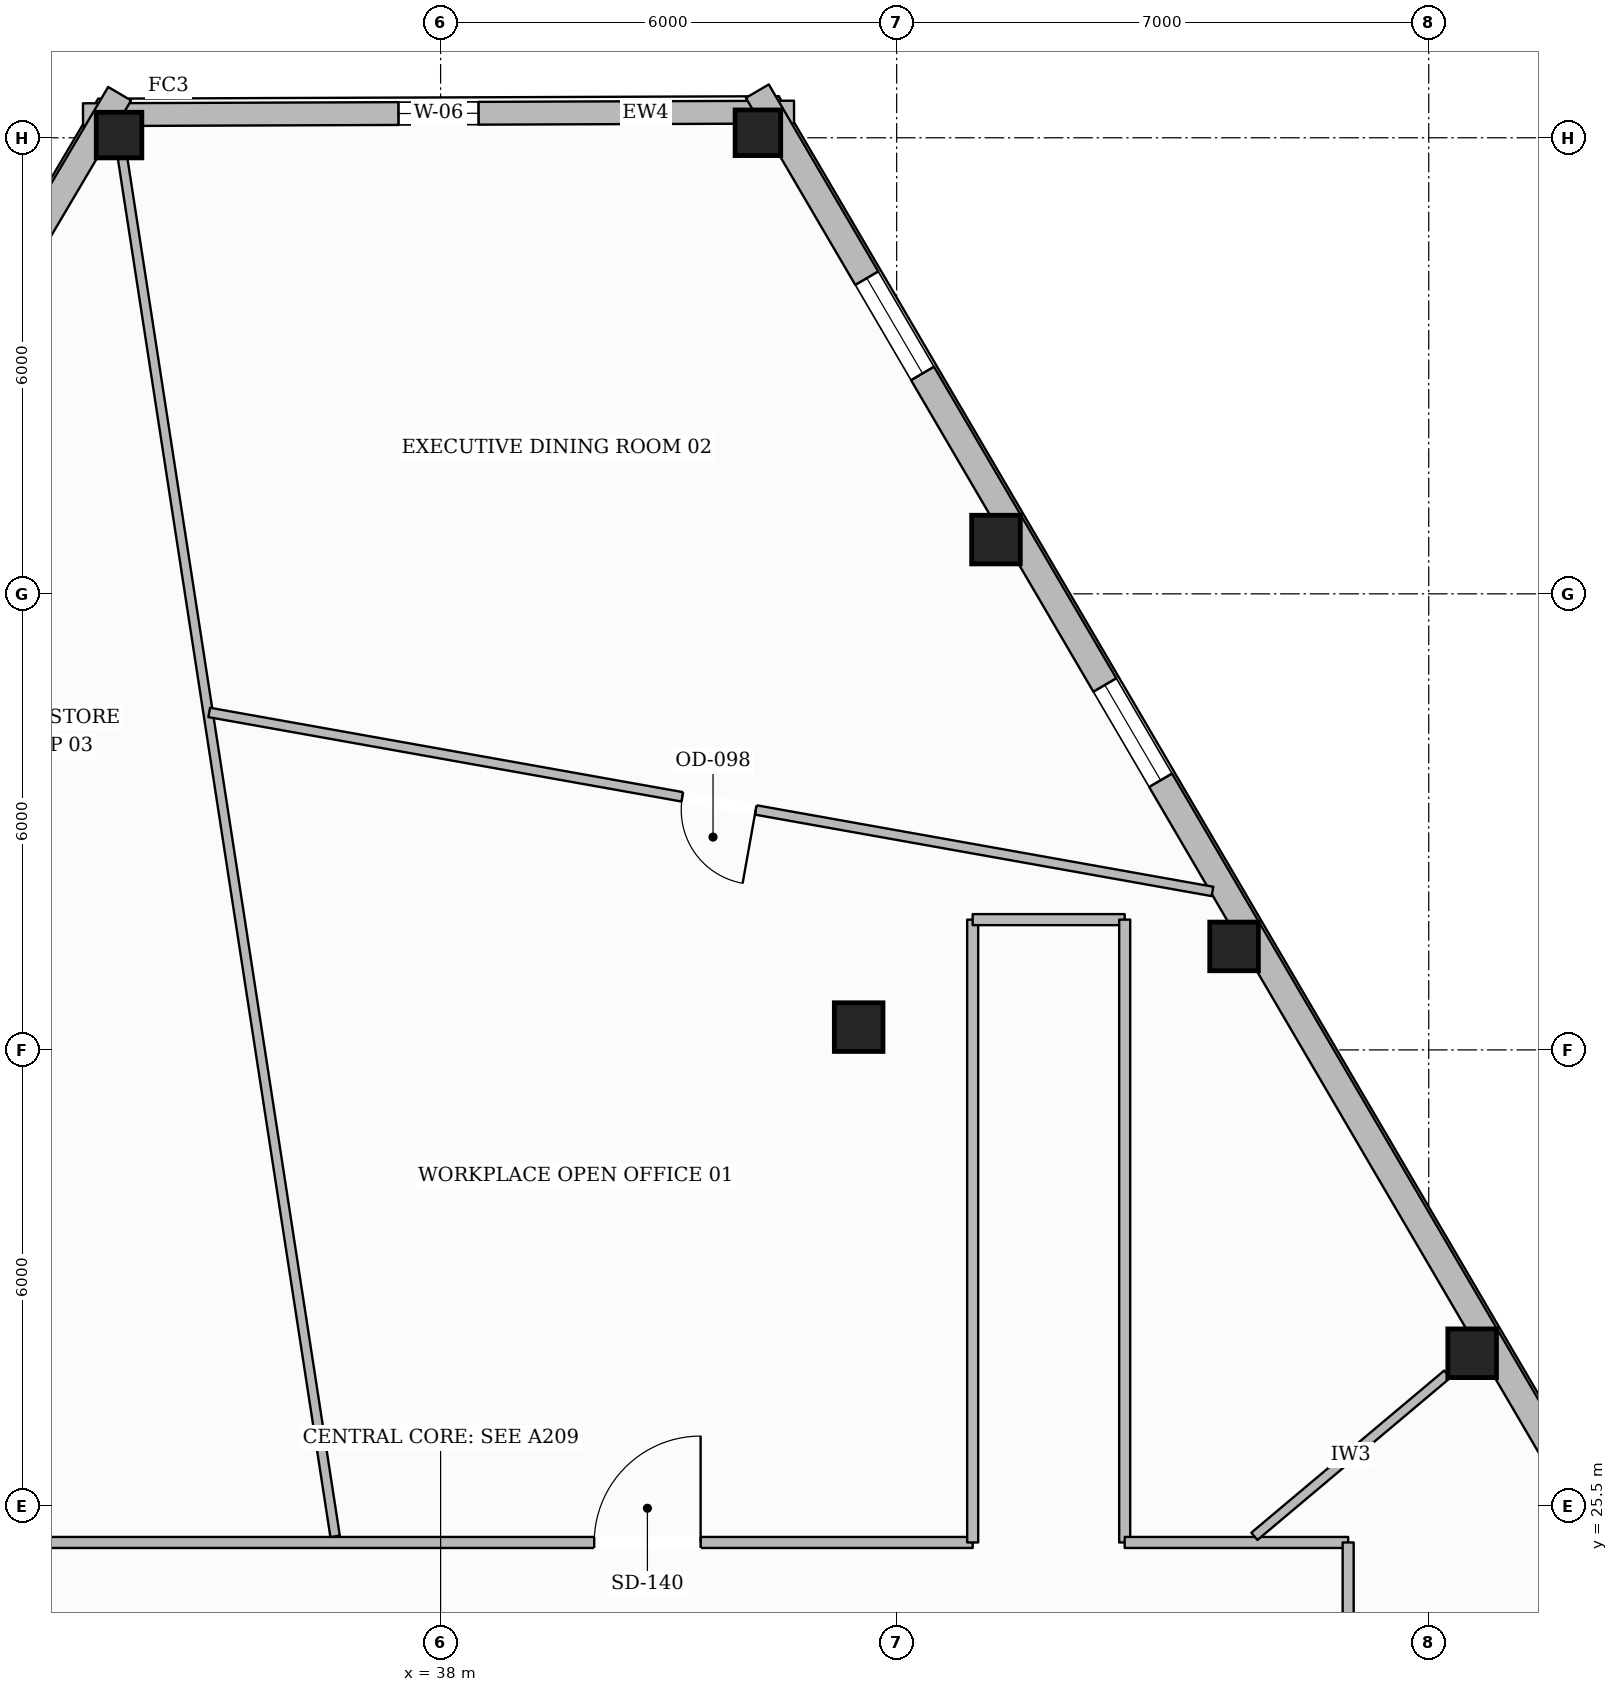
"""IFC4 building model, lengths in metres.
Left out: names, types, materials, properties, quantities, classifications, styles, units other than length and angle.
Written with IfcOpenShell. Run it as: python <this file> out.ifc"""

import sys

from ifc_helpers import new_model, si_unit, direction, frame, frame_2d, origin, origin_2d, place, context, subcontext, project, spatial, rectangle, hollow_rectangle, extrude, element, fill, save


model = new_model("IFC4")
c1 = context("Model", 3, precision=1e-05, world=origin(), true_north=direction((0.0, 1.0)))
c2 = subcontext(c1, "Body", "Model", "MODEL_VIEW")
j1 = project(units=[si_unit("LENGTHUNIT", "METRE"), si_unit("PLANEANGLEUNIT", "RADIAN")], contexts=[c1])
p1 = place(None, origin())
s1 = spatial("IfcSite", under=j1, at=p1, CompositionType="ELEMENT")
p2 = place(p1, origin())
s2 = spatial("IfcBuilding", under=s1, at=p2, CompositionType="ELEMENT")
p3 = place(p2, frame((0.0, 0.0, 207.35)))
s3 = spatial("IfcBuildingStorey", under=s2, at=p3, CompositionType="ELEMENT", Elevation=207.35)
p4 = place(p3, frame((33.769, 43.535, 0.0), z_axis=(0.0, 0.0, 1.0), x_axis=(1.0, 0.0, 0.0)))
e1 = element("IfcColumn", 1, at=p4, inside=s3, PredefinedType="COLUMN", context=c2, shape_type="SweptSolid", body=[
    extrude(hollow_rectangle(XDim=0.6, YDim=0.6, WallThickness=0.028, at=origin_2d()), origin(), (0.0, 0.0, 1.0), 3.6),
])
for number, where, z_axis, x_axis in (
    (2, (51.571, 27.509, 0.0), (0.0, 0.0, 1.0), (1.0, 0.0, 0.0)),
    (3, (48.439, 32.862, 0.0), (0.0, 0.0, 1.0), (1.0, 0.0, 0.0)),
    (4, (45.307, 38.214, 0.0), (0.0, 0.0, 1.0), (1.0, 0.0, 0.0)),
):
    element("IfcColumn", number, at=place(p3, frame(where, z_axis=z_axis, x_axis=x_axis)), inside=s3, PredefinedType="COLUMN", context=c2, shape_type="SweptSolid", body=[
        extrude(hollow_rectangle(XDim=0.64, YDim=0.64, WallThickness=0.028, at=origin_2d()), origin(), (0.0, 0.0, 1.0), 3.6),
    ])
p5 = place(p3, frame((42.174, 43.566, 0.0), z_axis=(0.0, 0.0, 1.0), x_axis=(1.0, 0.0, 0.0)))
e5 = element("IfcColumn", 5, at=p5, inside=s3, PredefinedType="COLUMN", context=c2, shape_type="SweptSolid", body=[
    extrude(hollow_rectangle(XDim=0.6, YDim=0.6, WallThickness=0.028, at=origin_2d()), origin(), (0.0, 0.0, 1.0), 3.6),
])
p6 = place(p3, frame((43.5, 31.8, 0.0), z_axis=(0.0, 0.0, 1.0), x_axis=(1.0, 0.0, 0.0)))
e6 = element("IfcColumn", 6, at=p6, inside=s3, PredefinedType="COLUMN", context=c2, shape_type="SweptSolid", body=[
    extrude(hollow_rectangle(XDim=0.64, YDim=0.64, WallThickness=0.028, at=origin_2d()), origin(), (0.0, 0.0, 1.0), 3.6),
])
p7 = place(p3, frame((33.295, 43.804, 0.0), z_axis=(0.0, 0.0, 1.0), x_axis=(0.999993419862, 0.003627703449, 0.0)))
e7 = element("IfcWall", 7, at=p7, inside=s3, PredefinedType="STANDARD", context=c2, shape_type="SweptSolid", body=[
    extrude(rectangle(XDim=9.354, YDim=0.3, at=frame_2d((4.677, 0.0))), origin(), (0.0, 0.0, 1.0), 3.132),
])
p8 = place(p7, frame((4.152, 0.0, 0.65)))
e8 = element("IfcOpeningElement", 8, at=p8, cuts=e7, PredefinedType="OPENING", context=c2, shape_type="SweptSolid", body=[
    extrude(rectangle(XDim=1.05, YDim=1.7, at=frame_2d((0.525, 0.85))), frame((0.0, 0.16, 0.0), z_axis=(0.0, -1.0, 0.0), x_axis=(1.0, 0.0, 0.0)), (0.0, 0.0, 1.0), 0.32),
])
p9 = place(p3, frame((14.256, 11.0, 0.0), z_axis=(0.0, 0.0, 1.0), x_axis=(0.508231558921, 0.861220461042, 0.0)))
e9 = element("IfcWall", 9, at=p9, inside=s3, PredefinedType="STANDARD", context=c2, shape_type="SweptSolid", body=[
    extrude(rectangle(XDim=38.41, YDim=0.35, at=frame_2d((19.205, 0.0))), origin(), (0.0, 0.0, 1.0), 3.132),
])
p10 = place(p9, frame((34.091, 0.0, 0.65)))
e10 = element("IfcOpeningElement", 10, at=p10, cuts=e9, PredefinedType="OPENING", context=c2, shape_type="SweptSolid", body=[
    extrude(rectangle(XDim=1.45, YDim=1.75, at=frame_2d((0.725, 0.875))), frame((0.0, 0.185, 0.0), z_axis=(0.0, -1.0, 0.0), x_axis=(1.0, 0.0, 0.0)), (0.0, 0.0, 1.0), 0.37),
])
p11 = place(p9, frame((27.848, 0.0, 0.65)))
e11 = element("IfcOpeningElement", 11, at=p11, cuts=e9, PredefinedType="OPENING", context=c2, shape_type="SweptSolid", body=[
    extrude(rectangle(XDim=1.45, YDim=1.75, at=frame_2d((0.725, 0.875))), frame((0.0, 0.185, 0.0), z_axis=(0.0, -1.0, 0.0), x_axis=(1.0, 0.0, 0.0)), (0.0, 0.0, 1.0), 0.37),
])
p12 = place(p9, frame((21.606, 0.0, 0.65)))
e12 = element("IfcOpeningElement", 12, at=p12, cuts=e9, PredefinedType="OPENING", context=c2, shape_type="SweptSolid", body=[
    extrude(rectangle(XDim=1.45, YDim=1.75, at=frame_2d((0.725, 0.875))), frame((0.0, 0.185, 0.0), z_axis=(0.0, -1.0, 0.0), x_axis=(1.0, 0.0, 0.0)), (0.0, 0.0, 1.0), 0.37),
])
p13 = place(p9, frame((9.121, 0.0, 0.65)))
e13 = element("IfcOpeningElement", 13, at=p13, cuts=e9, PredefinedType="OPENING", context=c2, shape_type="SweptSolid", body=[
    extrude(rectangle(XDim=1.45, YDim=1.75, at=frame_2d((0.725, 0.875))), frame((0.0, 0.185, 0.0), z_axis=(0.0, -1.0, 0.0), x_axis=(1.0, 0.0, 0.0)), (0.0, 0.0, 1.0), 0.37),
])
p14 = place(p9, frame((2.878, 0.0, 0.65)))
e14 = element("IfcOpeningElement", 14, at=p14, cuts=e9, PredefinedType="OPENING", context=c2, shape_type="SweptSolid", body=[
    extrude(rectangle(XDim=1.45, YDim=1.75, at=frame_2d((0.725, 0.875))), frame((0.0, 0.185, 0.0), z_axis=(0.0, -1.0, 0.0), x_axis=(1.0, 0.0, 0.0)), (0.0, 0.0, 1.0), 0.37),
])
p15 = place(p3, frame((42.167, 44.113, 0.0), z_axis=(0.0, 0.0, 1.0), x_axis=(0.50509390827, -0.863064391473, 0.0)))
e15 = element("IfcWall", 15, at=p15, inside=s3, PredefinedType="STANDARD", context=c2, shape_type="SweptSolid", body=[
    extrude(rectangle(XDim=38.167, YDim=0.35, at=frame_2d((19.083, 0.0))), origin(), (0.0, 0.0, 1.0), 3.132),
])
p16 = place(p15, frame((28.025, 0.0, 0.0)))
e16 = element("IfcOpeningElement", 16, at=p16, cuts=e15, PredefinedType="OPENING", context=c2, shape_type="SweptSolid", body=[
    extrude(rectangle(XDim=1.0, YDim=2.2, at=frame_2d((0.5, 1.1))), frame((0.0, 0.185, 0.0), z_axis=(0.0, -1.0, 0.0), x_axis=(1.0, 0.0, 0.0)), (0.0, 0.0, 1.0), 0.37),
])
p17 = place(p15, frame((33.859, 0.0, 0.65)))
e17 = element("IfcOpeningElement", 17, at=p17, cuts=e15, PredefinedType="OPENING", context=c2, shape_type="SweptSolid", body=[
    extrude(rectangle(XDim=1.45, YDim=1.75, at=frame_2d((0.725, 0.875))), frame((0.0, 0.185, 0.0), z_axis=(0.0, -1.0, 0.0), x_axis=(1.0, 0.0, 0.0)), (0.0, 0.0, 1.0), 0.37),
])
p18 = place(p15, frame((21.456, 0.0, 0.65)))
e18 = element("IfcOpeningElement", 18, at=p18, cuts=e15, PredefinedType="OPENING", context=c2, shape_type="SweptSolid", body=[
    extrude(rectangle(XDim=1.45, YDim=1.75, at=frame_2d((0.725, 0.875))), frame((0.0, 0.185, 0.0), z_axis=(0.0, -1.0, 0.0), x_axis=(1.0, 0.0, 0.0)), (0.0, 0.0, 1.0), 0.37),
])
p19 = place(p15, frame((9.053, 0.0, 0.65)))
e19 = element("IfcOpeningElement", 19, at=p19, cuts=e15, PredefinedType="OPENING", context=c2, shape_type="SweptSolid", body=[
    extrude(rectangle(XDim=1.45, YDim=1.75, at=frame_2d((0.725, 0.875))), frame((0.0, 0.185, 0.0), z_axis=(0.0, -1.0, 0.0), x_axis=(1.0, 0.0, 0.0)), (0.0, 0.0, 1.0), 0.37),
])
p20 = place(p15, frame((2.852, 0.0, 0.65)))
e20 = element("IfcOpeningElement", 20, at=p20, cuts=e15, PredefinedType="OPENING", context=c2, shape_type="SweptSolid", body=[
    extrude(rectangle(XDim=1.45, YDim=1.75, at=frame_2d((0.725, 0.875))), frame((0.0, 0.185, 0.0), z_axis=(0.0, -1.0, 0.0), x_axis=(1.0, 0.0, 0.0)), (0.0, 0.0, 1.0), 0.37),
])
p21 = place(p3, frame((31.0, 25.02, 0.0), z_axis=(0.0, 0.0, 1.0), x_axis=(1.0, 0.0, 0.0)))
e21 = element("IfcWall", 21, at=p21, inside=s3, PredefinedType="PARTITIONING", context=c2, shape_type="SweptSolid", body=[
    extrude(rectangle(XDim=14.0, YDim=0.145, at=frame_2d((7.0, 0.0))), origin(), (0.0, 0.0, 1.0), 3.6),
])
p22 = place(p21, frame((9.021, 0.0, 0.0)))
e22 = element("IfcOpeningElement", 22, at=p22, cuts=e21, PredefinedType="OPENING", context=c2, shape_type="SweptSolid", body=[
    extrude(rectangle(XDim=1.4, YDim=2.2, at=frame_2d((0.7, 1.1))), frame((0.0, 0.083, 0.0), z_axis=(0.0, -1.0, 0.0), x_axis=(1.0, 0.0, 0.0)), (0.0, 0.0, 1.0), 0.165),
])
p23 = place(p3, frame((45.0, 25.02, 0.0), z_axis=(0.0, 0.0, 1.0), x_axis=(0.0, 1.0, 0.0)))
e23 = element("IfcWall", 23, at=p23, inside=s3, PredefinedType="PARTITIONING", context=c2, shape_type="SweptSolid", body=[
    extrude(rectangle(XDim=8.194, YDim=0.145, at=frame_2d((4.097, 0.0))), origin(), (0.0, 0.0, 1.0), 3.6),
])
p24 = place(p3, frame((45.0, 33.214, 0.0), z_axis=(0.0, 0.0, 1.0), x_axis=(1.0, 0.0, 0.0)))
e24 = element("IfcWall", 24, at=p24, inside=s3, PredefinedType="PARTITIONING", context=c2, shape_type="SweptSolid", body=[
    extrude(rectangle(XDim=2.0, YDim=0.145, at=frame_2d((1.0, 0.0))), origin(), (0.0, 0.0, 1.0), 3.6),
])
p25 = place(p3, frame((47.0, 33.214, 0.0), z_axis=(0.0, 0.0, 1.0), x_axis=(0.0, -1.0, 0.0)))
e25 = element("IfcWall", 25, at=p25, inside=s3, PredefinedType="PARTITIONING", context=c2, shape_type="SweptSolid", body=[
    extrude(rectangle(XDim=8.194, YDim=0.145, at=frame_2d((4.097, 0.0))), origin(), (0.0, 0.0, 1.0), 3.6),
])
p26 = place(p3, frame((47.0, 25.02, 0.0), z_axis=(0.0, 0.0, 1.0), x_axis=(1.0, 0.0, 0.0)))
e26 = element("IfcWall", 26, at=p26, inside=s3, PredefinedType="PARTITIONING", context=c2, shape_type="SweptSolid", body=[
    extrude(rectangle(XDim=2.94, YDim=0.145, at=frame_2d((1.47, 0.0))), origin(), (0.0, 0.0, 1.0), 3.6),
])
p27 = place(p3, frame((49.94, 25.02, 0.0), z_axis=(0.0, 0.0, 1.0), x_axis=(0.0, -1.0, 0.0)))
e27 = element("IfcWall", 27, at=p27, inside=s3, PredefinedType="PARTITIONING", context=c2, shape_type="SweptSolid", body=[
    extrude(rectangle(XDim=7.92, YDim=0.145, at=frame_2d((3.96, 0.0))), origin(), (0.0, 0.0, 1.0), 3.339),
])
p28 = place(p27, frame((3.26, 0.0, 0.0)))
e28 = element("IfcOpeningElement", 28, at=p28, cuts=e27, PredefinedType="OPENING", context=c2, shape_type="SweptSolid", body=[
    extrude(rectangle(XDim=1.4, YDim=2.2, at=frame_2d((0.7, 1.1))), frame((0.0, 0.083, 0.0), z_axis=(0.0, -1.0, 0.0), x_axis=(1.0, 0.0, 0.0)), (0.0, 0.0, 1.0), 0.165),
])
p29 = place(p3, frame((48.706, 25.101, 0.0), z_axis=(0.0, 0.0, 1.0), x_axis=(0.765461031338, 0.643482252672, 0.0)))
e29 = element("IfcWall", 29, at=p29, inside=s3, PredefinedType="PARTITIONING", context=c2, shape_type="SweptSolid", body=[
    extrude(rectangle(XDim=3.314, YDim=0.125, at=frame_2d((1.657, 0.0))), origin(), (0.0, 0.0, 1.0), 3.141),
])
p30 = place(p3, frame((36.612, 25.101, 0.0), z_axis=(0.0, 0.0, 1.0), x_axis=(-0.152413268287, 0.988316849826, 0.0)))
e30 = element("IfcWall", 30, at=p30, inside=s3, PredefinedType="PARTITIONING", context=c2, shape_type="SweptSolid", body=[
    extrude(rectangle(XDim=18.341, YDim=0.125, at=frame_2d((9.17, 0.0))), origin(), (0.0, 0.0, 1.0), 3.141),
])
p31 = place(p3, frame((48.155, 33.585, 0.0), z_axis=(0.0, 0.0, 1.0), x_axis=(-0.98445311225, 0.175647572661, 0.0)))
e31 = element("IfcWall", 31, at=p31, inside=s3, PredefinedType="PARTITIONING", context=c2, shape_type="SweptSolid", body=[
    extrude(rectangle(XDim=13.407, YDim=0.125, at=frame_2d((6.704, 0.0))), origin(), (0.0, 0.0, 1.0), 3.6),
])
p32 = place(p31, frame((6.104, 0.0, 0.0)))
e32 = element("IfcOpeningElement", 32, at=p32, cuts=e31, PredefinedType="OPENING", context=c2, shape_type="SweptSolid", body=[
    extrude(rectangle(XDim=0.98, YDim=2.15, at=frame_2d((0.49, 1.075))), frame((0.0, 0.073, 0.0), z_axis=(0.0, -1.0, 0.0), x_axis=(1.0, 0.0, 0.0)), (0.0, 0.0, 1.0), 0.145),
])
p33 = place(p19, origin())
e33 = element("IfcWindow", 33, at=p33, inside=s3, PartitioningType="SINGLE_PANEL", PredefinedType="WINDOW", context=c2, shape_type="SweptSolid", body=[
    extrude(rectangle(XDim=1.45, YDim=1.75, at=frame_2d((0.725, 0.875))), frame((0.0, 0.03, 0.0), z_axis=(0.0, -1.0, 0.0), x_axis=(1.0, 0.0, 0.0)), (0.0, 0.0, 1.0), 0.06),
])
fill(e19, e33)
p34 = place(p20, origin())
e34 = element("IfcWindow", 34, at=p34, inside=s3, PartitioningType="SINGLE_PANEL", PredefinedType="WINDOW", context=c2, shape_type="SweptSolid", body=[
    extrude(rectangle(XDim=1.45, YDim=1.75, at=frame_2d((0.725, 0.875))), frame((0.0, 0.03, 0.0), z_axis=(0.0, -1.0, 0.0), x_axis=(1.0, 0.0, 0.0)), (0.0, 0.0, 1.0), 0.06),
])
fill(e20, e34)
p35 = place(p8, origin())
e35 = element("IfcWindow", 35, at=p35, inside=s3, PartitioningType="SINGLE_PANEL", PredefinedType="WINDOW", context=c2, shape_type="SweptSolid", body=[
    extrude(rectangle(XDim=1.05, YDim=1.7, at=frame_2d((0.525, 0.85))), frame((0.0, 0.03, 0.0), z_axis=(0.0, -1.0, 0.0), x_axis=(1.0, 0.0, 0.0)), (0.0, 0.0, 1.0), 0.06),
])
fill(e8, e35)
p36 = place(p22, origin())
e36 = element("IfcDoor", 36, at=p36, inside=s3, OperationType="SINGLE_SWING_RIGHT", PredefinedType="DOOR", context=c2, shape_type="SweptSolid", body=[
    extrude(rectangle(XDim=1.4, YDim=2.2, at=frame_2d((0.7, 1.1))), frame((0.0, 0.025, 0.0), z_axis=(0.0, -1.0, 0.0), x_axis=(1.0, 0.0, 0.0)), (0.0, 0.0, 1.0), 0.05),
])
fill(e22, e36)
p37 = place(p32, origin())
e37 = element("IfcDoor", 37, at=p37, inside=s3, OperationType="SINGLE_SWING_LEFT", PredefinedType="DOOR", context=c2, shape_type="SweptSolid", body=[
    extrude(rectangle(XDim=0.98, YDim=2.15, at=frame_2d((0.49, 1.075))), frame((0.0, 0.025, 0.0), z_axis=(0.0, -1.0, 0.0), x_axis=(1.0, 0.0, 0.0)), (0.0, 0.0, 1.0), 0.05),
])
fill(e32, e37)
save(model, sys.argv[1])
